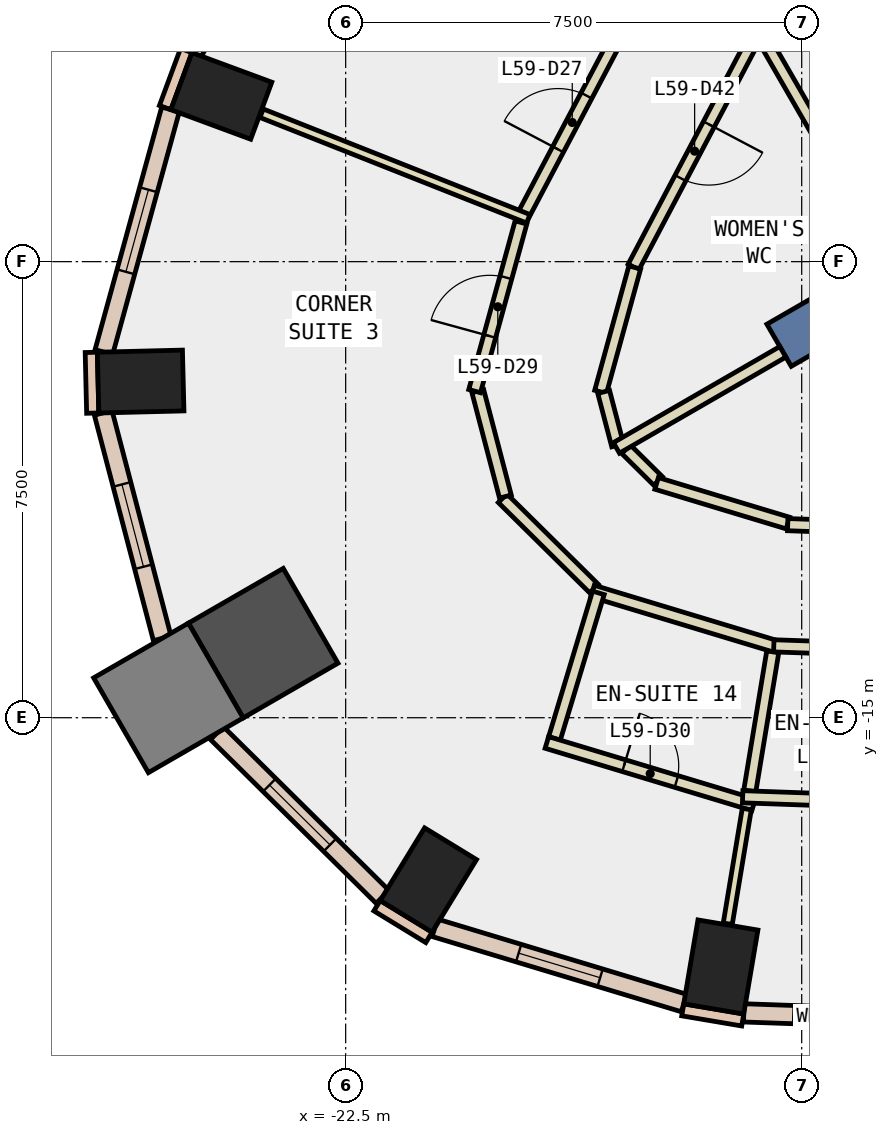
"""IFC4 building model, lengths in metres.
Left out: names, types, materials, properties, quantities, classifications, styles, units other than length and angle.
Written with IfcOpenShell. Run it as: python <this file> out.ifc"""

import sys

from ifc_helpers import new_model, si_unit, direction, frame, frame_2d, origin, origin_2d, place, context, subcontext, project, spatial, rectangle, extrude, element, fill, save


model = new_model("IFC4")
c1 = context("Model", 3, precision=1e-05, world=origin(), true_north=direction((0.0, 1.0)))
c2 = subcontext(c1, "Body", "Model", "MODEL_VIEW")
j1 = project(units=[si_unit("LENGTHUNIT", "METRE"), si_unit("PLANEANGLEUNIT", "RADIAN")], contexts=[c1])
p1 = place(None, origin())
s1 = spatial("IfcSite", under=j1, at=p1, CompositionType="ELEMENT")
p2 = place(p1, origin())
s2 = spatial("IfcBuilding", under=s1, at=p2, CompositionType="ELEMENT")
p3 = place(p2, frame((0.0, 0.0, 259.4)))
s3 = spatial("IfcBuildingStorey", under=s2, at=p3, CompositionType="ELEMENT", Elevation=259.4)
for number, where, z_axis, x_axis in (
    (1, (-16.33, -19.099, -0.34), (0.0, 0.0, 1.0), (-0.986, 0.167, 0.0)),
    (2, (-24.545, -4.775, -0.34), (0.0, 0.0, 1.0), (0.347, 0.938, 0.0)),
    (3, (-25.872, -9.472, -0.34), (0.0, 0.0, 1.0), (-0.025, 1.0, 0.0)),
):
    element("IfcColumn", number, at=place(p3, frame(where, z_axis=z_axis, x_axis=x_axis)), inside=s3, PredefinedType="COLUMN", context=c2, shape_type="SweptSolid", body=[
        extrude(rectangle(XDim=1.0, YDim=1.4, at=origin_2d()), origin(), (0.0, 0.0, 1.0), 3.6),
    ])
p4 = place(p3, frame((-23.856, -13.774, -0.34), z_axis=(0.0, 0.0, 1.0), x_axis=(0.866025403784, 0.5, 0.0)))
e4 = element("IfcColumn", 4, at=p4, inside=s3, PredefinedType="COLUMN", context=c2, shape_type="SweptSolid", body=[
    extrude(rectangle(XDim=1.8, YDim=1.8, at=origin_2d()), origin(), (0.0, 0.0, 1.0), 3.6),
])
p5 = place(p3, frame((-21.14, -17.67, -0.34), z_axis=(0.0, 0.0, 1.0), x_axis=(-0.853341581839, 0.521352227103, 0.0)))
e5 = element("IfcColumn", 5, at=p5, inside=s3, PredefinedType="COLUMN", context=c2, shape_type="SweptSolid", body=[
    extrude(rectangle(XDim=1.0, YDim=1.4, at=origin_2d()), origin(), (0.0, 0.0, 1.0), 3.6),
])
p6 = place(p3, frame((-25.415, -14.674, -0.34), z_axis=(0.0, 0.0, 1.0), x_axis=(0.866025403784, 0.5, 0.0)))
e6 = element("IfcColumn", 6, at=p6, inside=s3, PredefinedType="COLUMN", context=c2, shape_type="SweptSolid", body=[
    extrude(rectangle(XDim=1.8, YDim=1.8, at=origin_2d()), origin(), (0.0, 0.0, 1.0), 3.6),
])
p7 = place(p3, frame((-7.578, -4.375, -0.34), z_axis=(0.0, 0.0, 1.0), x_axis=(-0.866024315419, -0.5000018851, 0.0)))
e7 = element("IfcWall", 7, at=p7, inside=s3, PredefinedType="SHEAR", context=c2, shape_type="SweptSolid", body=[
    extrude(rectangle(XDim=9.0, YDim=0.8, at=frame_2d((4.5, 0.0))), origin(), (0.0, 0.0, 1.0), 3.6),
])
p8 = place(p3, frame((-25.122, -4.029, 0.0), z_axis=(0.0, 0.0, 1.0), x_axis=(-0.346892928577, -0.937904737222, 0.0)))
e8 = element("IfcWall", 8, at=p8, inside=s3, PredefinedType="STANDARD", context=c2, shape_type="SweptSolid", body=[
    extrude(rectangle(XDim=1.0, YDim=0.2, at=frame_2d((0.5, 0.0))), origin(), (0.0, 0.0, 1.0), 3.26),
])
p9 = place(p3, frame((-16.956, -19.804, 0.0), z_axis=(0.0, 0.0, 1.0), x_axis=(0.985961725342, -0.166971483074, 0.0)))
e9 = element("IfcWall", 9, at=p9, inside=s3, PredefinedType="STANDARD", context=c2, shape_type="SweptSolid", body=[
    extrude(rectangle(XDim=1.0, YDim=0.2, at=frame_2d((0.5, 0.0))), origin(), (0.0, 0.0, 1.0), 3.26),
])
p10 = place(p3, frame((-26.684, -8.992, 0.0), z_axis=(0.0, 0.0, 1.0), x_axis=(0.024186470916, -0.999707464524, 0.0)))
e10 = element("IfcWall", 10, at=p10, inside=s3, PredefinedType="STANDARD", context=c2, shape_type="SweptSolid", body=[
    extrude(rectangle(XDim=0.999, YDim=0.2, at=frame_2d((0.5, 0.0))), origin(), (0.0, 0.0, 1.0), 3.26),
])
p11 = place(p3, frame((-21.984, -18.092, 0.0), z_axis=(0.0, 0.0, 1.0), x_axis=(0.853679739553, -0.520798331677, 0.0)))
e11 = element("IfcWall", 11, at=p11, inside=s3, PredefinedType="STANDARD", context=c2, shape_type="SweptSolid", body=[
    extrude(rectangle(XDim=1.0, YDim=0.2, at=frame_2d((0.5, 0.0))), origin(), (0.0, 0.0, 1.0), 3.26),
])
p12 = place(p3, frame((-15.952, -19.854, 0.0), z_axis=(0.0, 0.0, 1.0), x_axis=(0.999387577449, -0.034992428331, 0.0)))
e12 = element("IfcWall", 12, at=p12, inside=s3, PredefinedType="STANDARD", context=c2, shape_type="SweptSolid", body=[
    extrude(rectangle(XDim=7.661, YDim=0.3, at=frame_2d((3.83, 0.0))), origin(), (0.0, 0.0, 1.0), 3.26),
])
p13 = place(p12, frame((0.815, 0.0, 0.9)))
e13 = element("IfcOpeningElement", 13, at=p13, cuts=e12, PredefinedType="OPENING", context=c2, shape_type="SweptSolid", body=[
    extrude(rectangle(XDim=2.2, YDim=2.0, at=frame_2d((1.1, 1.0))), frame((0.0, 0.16, 0.0), z_axis=(0.0, -1.0, 0.0), x_axis=(1.0, 0.0, 0.0)), (0.0, 0.0, 1.0), 0.32),
])
p14 = place(p12, frame((4.646, 0.0, 0.9)))
e14 = element("IfcOpeningElement", 14, at=p14, cuts=e12, PredefinedType="OPENING", context=c2, shape_type="SweptSolid", body=[
    extrude(rectangle(XDim=2.2, YDim=2.0, at=frame_2d((1.1, 1.0))), frame((0.0, 0.16, 0.0), z_axis=(0.0, -1.0, 0.0), x_axis=(1.0, 0.0, 0.0)), (0.0, 0.0, 1.0), 0.32),
])
p15 = place(p3, frame((-22.381, 0.916, 0.0), z_axis=(0.0, 0.0, 1.0), x_axis=(-0.466663589714, -0.884434900959, 0.0)))
e15 = element("IfcWall", 15, at=p15, inside=s3, PredefinedType="STANDARD", context=c2, shape_type="SweptSolid", body=[
    extrude(rectangle(XDim=5.638, YDim=0.3, at=frame_2d((2.819, 0.0))), origin(), (0.0, 0.0, 1.0), 3.26),
])
p16 = place(p15, frame((0.459, 0.0, 0.9)))
e16 = element("IfcOpeningElement", 16, at=p16, cuts=e15, PredefinedType="OPENING", context=c2, shape_type="SweptSolid", body=[
    extrude(rectangle(XDim=1.9, YDim=2.0, at=frame_2d((0.95, 1.0))), frame((0.0, 0.16, 0.0), z_axis=(0.0, -1.0, 0.0), x_axis=(1.0, 0.0, 0.0)), (0.0, 0.0, 1.0), 0.32),
])
p17 = place(p15, frame((3.278, 0.0, 0.9)))
e17 = element("IfcOpeningElement", 17, at=p17, cuts=e15, PredefinedType="OPENING", context=c2, shape_type="SweptSolid", body=[
    extrude(rectangle(XDim=1.9, YDim=2.0, at=frame_2d((0.95, 1.0))), frame((0.0, 0.16, 0.0), z_axis=(0.0, -1.0, 0.0), x_axis=(1.0, 0.0, 0.0)), (0.0, 0.0, 1.0), 0.32),
])
p18 = place(p3, frame((-25.381, -4.998, 0.0), z_axis=(0.0, 0.0, 1.0), x_axis=(-0.264924661919, -0.964269113633, 0.0)))
e18 = element("IfcWall", 18, at=p18, inside=s3, PredefinedType="STANDARD", context=c2, shape_type="SweptSolid", body=[
    extrude(rectangle(XDim=4.137, YDim=0.3, at=frame_2d((2.068, 0.0))), origin(), (0.0, 0.0, 1.0), 3.26),
])
p19 = place(p18, frame((1.368, 0.0, 0.9)))
e19 = element("IfcOpeningElement", 19, at=p19, cuts=e18, PredefinedType="OPENING", context=c2, shape_type="SweptSolid", body=[
    extrude(rectangle(XDim=1.4, YDim=2.0, at=frame_2d((0.7, 1.0))), frame((0.0, 0.16, 0.0), z_axis=(0.0, -1.0, 0.0), x_axis=(1.0, 0.0, 0.0)), (0.0, 0.0, 1.0), 0.32),
])
p20 = place(p3, frame((-26.488, -9.986, 0.0), z_axis=(0.0, 0.0, 1.0), x_axis=(0.253248721632, -0.967401201669, 0.0)))
e20 = element("IfcWall", 20, at=p20, inside=s3, PredefinedType="STANDARD", context=c2, shape_type="SweptSolid", body=[
    extrude(rectangle(XDim=3.834, YDim=0.3, at=frame_2d((1.917, 0.0))), origin(), (0.0, 0.0, 1.0), 3.26),
])
p21 = place(p20, frame((1.217, 0.0, 0.9)))
e21 = element("IfcOpeningElement", 21, at=p21, cuts=e20, PredefinedType="OPENING", context=c2, shape_type="SweptSolid", body=[
    extrude(rectangle(XDim=1.4, YDim=2.0, at=frame_2d((0.7, 1.0))), frame((0.0, 0.16, 0.0), z_axis=(0.0, -1.0, 0.0), x_axis=(1.0, 0.0, 0.0)), (0.0, 0.0, 1.0), 0.32),
])
p22 = place(p3, frame((-24.618, -15.252, 0.0), z_axis=(0.0, 0.0, 1.0), x_axis=(0.71110935557, -0.703081420904, 0.0)))
e22 = element("IfcWall", 22, at=p22, inside=s3, PredefinedType="STANDARD", context=c2, shape_type="SweptSolid", body=[
    extrude(rectangle(XDim=3.832, YDim=0.3, at=frame_2d((1.916, 0.0))), origin(), (0.0, 0.0, 1.0), 3.26),
])
p23 = place(p22, frame((1.216, 0.0, 0.9)))
e23 = element("IfcOpeningElement", 23, at=p23, cuts=e22, PredefinedType="OPENING", context=c2, shape_type="SweptSolid", body=[
    extrude(rectangle(XDim=1.4, YDim=2.0, at=frame_2d((0.7, 1.0))), frame((0.0, 0.16, 0.0), z_axis=(0.0, -1.0, 0.0), x_axis=(1.0, 0.0, 0.0)), (0.0, 0.0, 1.0), 0.32),
])
p24 = place(p3, frame((-21.034, -18.455, 0.0), z_axis=(0.0, 0.0, 1.0), x_axis=(0.957346168713, -0.288943442997, 0.0)))
e24 = element("IfcWall", 24, at=p24, inside=s3, PredefinedType="STANDARD", context=c2, shape_type="SweptSolid", body=[
    extrude(rectangle(XDim=4.281, YDim=0.3, at=frame_2d((2.14, 0.0))), origin(), (0.0, 0.0, 1.0), 3.26),
])
p25 = place(p24, frame((1.44, 0.0, 0.9)))
e25 = element("IfcOpeningElement", 25, at=p25, cuts=e24, PredefinedType="OPENING", context=c2, shape_type="SweptSolid", body=[
    extrude(rectangle(XDim=1.4, YDim=2.0, at=frame_2d((0.7, 1.0))), frame((0.0, 0.16, 0.0), z_axis=(0.0, -1.0, 0.0), x_axis=(1.0, 0.0, 0.0)), (0.0, 0.0, 1.0), 0.32),
])
p26 = place(p3, frame((-15.756, -3.779, 0.0), z_axis=(0.0, 0.0, 1.0), x_axis=(-0.46672043873, -0.884404902786, 0.0)))
e26 = element("IfcWall", 26, at=p26, inside=s3, PredefinedType="PARTITIONING", context=c2, shape_type="SweptSolid", body=[
    extrude(rectangle(XDim=4.307, YDim=0.2, at=frame_2d((2.153, 0.0))), origin(), (0.0, 0.0, 1.0), 3.26),
])
p27 = place(p26, frame((1.653, 0.0, 0.0)))
e27 = element("IfcOpeningElement", 27, at=p27, cuts=e26, PredefinedType="OPENING", context=c2, shape_type="SweptSolid", body=[
    extrude(rectangle(XDim=1.0, YDim=2.1, at=frame_2d((0.5, 1.05))), frame((0.0, 0.11, 0.0), z_axis=(0.0, -1.0, 0.0), x_axis=(1.0, 0.0, 0.0)), (0.0, 0.0, 1.0), 0.22),
])
p28 = place(p3, frame((-17.746, -7.596, 0.0), z_axis=(0.0, 0.0, 1.0), x_axis=(-0.264859637197, -0.96428697626, 0.0)))
e28 = element("IfcWall", 28, at=p28, inside=s3, PredefinedType="PARTITIONING", context=c2, shape_type="SweptSolid", body=[
    extrude(rectangle(XDim=2.122, YDim=0.2, at=frame_2d((1.061, 0.0))), origin(), (0.0, 0.0, 1.0), 3.26),
])
p29 = place(p3, frame((-18.257, -9.642, 0.0), z_axis=(0.0, 0.0, 1.0), x_axis=(0.253407342366, -0.967359663639, 0.0)))
e29 = element("IfcWall", 29, at=p29, inside=s3, PredefinedType="PARTITIONING", context=c2, shape_type="SweptSolid", body=[
    extrude(rectangle(XDim=0.907, YDim=0.2, at=frame_2d((0.454, 0.0))), origin(), (0.0, 0.0, 1.0), 3.26),
])
p30 = place(p3, frame((-17.89, -10.584, 0.0), z_axis=(0.0, 0.0, 1.0), x_axis=(0.711042348586, -0.70314918653, 0.0)))
e30 = element("IfcWall", 30, at=p30, inside=s3, PredefinedType="PARTITIONING", context=c2, shape_type="SweptSolid", body=[
    extrude(rectangle(XDim=0.742, YDim=0.2, at=frame_2d((0.371, 0.0))), origin(), (0.0, 0.0, 1.0), 3.26),
])
p31 = place(p3, frame((-17.386, -11.147, 0.0), z_axis=(0.0, 0.0, 1.0), x_axis=(0.957321496956, -0.289025174451, 0.0)))
e31 = element("IfcWall", 31, at=p31, inside=s3, PredefinedType="PARTITIONING", context=c2, shape_type="SweptSolid", body=[
    extrude(rectangle(XDim=2.256, YDim=0.2, at=frame_2d((1.128, 0.0))), origin(), (0.0, 0.0, 1.0), 3.26),
])
p32 = place(p3, frame((-15.23, -11.825, 0.0), z_axis=(0.0, 0.0, 1.0), x_axis=(0.999397560436, -0.0347061406, 0.0)))
e32 = element("IfcWall", 32, at=p32, inside=s3, PredefinedType="PARTITIONING", context=c2, shape_type="SweptSolid", body=[
    extrude(rectangle(XDim=4.207, YDim=0.2, at=frame_2d((2.103, 0.0))), origin(), (0.0, 0.0, 1.0), 3.26),
])
p33 = place(p32, frame((1.603, 0.0, 0.0)))
e33 = element("IfcOpeningElement", 33, at=p33, cuts=e32, PredefinedType="OPENING", context=c2, shape_type="SweptSolid", body=[
    extrude(rectangle(XDim=1.0, YDim=2.1, at=frame_2d((0.5, 1.05))), frame((0.0, 0.11, 0.0), z_axis=(0.0, -1.0, 0.0), x_axis=(1.0, 0.0, 0.0)), (0.0, 0.0, 1.0), 0.22),
])
p34 = place(p3, frame((-19.602, -6.781, 0.0), z_axis=(0.0, 0.0, 1.0), x_axis=(0.466827780692, 0.884348247679, 0.0)))
e34 = element("IfcWall", 34, at=p34, inside=s3, PredefinedType="PARTITIONING", context=c2, shape_type="SweptSolid", body=[
    extrude(rectangle(XDim=3.451, YDim=0.2, at=frame_2d((1.726, 0.0))), origin(), (0.0, 0.0, 1.0), 3.26),
])
p35 = place(p34, frame((1.275, 0.0, 0.0)))
e35 = element("IfcOpeningElement", 35, at=p35, cuts=e34, PredefinedType="OPENING", context=c2, shape_type="SweptSolid", body=[
    extrude(rectangle(XDim=1.0, YDim=2.1, at=frame_2d((0.5, 1.05))), frame((0.0, 0.11, 0.0), z_axis=(0.0, -1.0, 0.0), x_axis=(1.0, 0.0, 0.0)), (0.0, 0.0, 1.0), 0.22),
])
p36 = place(p3, frame((-18.415, -12.877, 0.0), z_axis=(0.0, 0.0, 1.0), x_axis=(-0.711078065077, 0.70311306727, 0.0)))
e36 = element("IfcWall", 36, at=p36, inside=s3, PredefinedType="PARTITIONING", context=c2, shape_type="SweptSolid", body=[
    extrude(rectangle(XDim=2.115, YDim=0.2, at=frame_2d((1.058, 0.0))), origin(), (0.0, 0.0, 1.0), 3.26),
])
p37 = place(p3, frame((-19.873, -11.363, 0.0), z_axis=(0.0, 0.0, 1.0), x_axis=(-0.253192482031, 0.967415922467, 0.0)))
e37 = element("IfcWall", 37, at=p37, inside=s3, PredefinedType="PARTITIONING", context=c2, shape_type="SweptSolid", body=[
    extrude(rectangle(XDim=1.792, YDim=0.2, at=frame_2d((0.896, 0.0))), origin(), (0.0, 0.0, 1.0), 3.26),
])
p38 = place(p3, frame((-20.379, -9.629, 0.0), z_axis=(0.0, 0.0, 1.0), x_axis=(0.26487636938, 0.964282380293, 0.0)))
e38 = element("IfcWall", 38, at=p38, inside=s3, PredefinedType="PARTITIONING", context=c2, shape_type="SweptSolid", body=[
    extrude(rectangle(XDim=2.877, YDim=0.2, at=frame_2d((1.438, 0.0))), origin(), (0.0, 0.0, 1.0), 3.26),
])
p39 = place(p38, frame((0.938, 0.0, 0.0)))
e39 = element("IfcOpeningElement", 39, at=p39, cuts=e38, PredefinedType="OPENING", context=c2, shape_type="SweptSolid", body=[
    extrude(rectangle(XDim=1.0, YDim=2.1, at=frame_2d((0.5, 1.05))), frame((0.0, 0.11, 0.0), z_axis=(0.0, -1.0, 0.0), x_axis=(1.0, 0.0, 0.0)), (0.0, 0.0, 1.0), 0.22),
])
p40 = place(p3, frame((-15.363, -13.847, 0.0), z_axis=(0.0, 0.0, 1.0), x_axis=(-0.957320969561, 0.289026921303, 0.0)))
e40 = element("IfcWall", 40, at=p40, inside=s3, PredefinedType="PARTITIONING", context=c2, shape_type="SweptSolid", body=[
    extrude(rectangle(XDim=3.214, YDim=0.2, at=frame_2d((1.607, 0.0))), origin(), (0.0, 0.0, 1.0), 3.26),
])
p41 = place(p3, frame((-12.961, -13.905, 0.0), z_axis=(0.0, 0.0, 1.0), x_axis=(-0.999395279268, 0.034771766949, 0.0)))
e41 = element("IfcWall", 41, at=p41, inside=s3, PredefinedType="PARTITIONING", context=c2, shape_type="SweptSolid", body=[
    extrude(rectangle(XDim=2.5, YDim=0.2, at=frame_2d((1.25, 0.0))), origin(), (0.0, 0.0, 1.0), 3.26),
])
p42 = place(p3, frame((-13.58, -7.379, 0.0), z_axis=(0.0, 0.0, 1.0), x_axis=(-0.499916403993, 0.866073662582, 0.0)))
e42 = element("IfcWall", 42, at=p42, inside=s3, PredefinedType="PARTITIONING", context=c2, shape_type="SweptSolid", body=[
    extrude(rectangle(XDim=4.359, YDim=0.2, at=frame_2d((2.179, 0.0))), origin(), (0.0, 0.0, 1.0), 3.26),
])
p43 = place(p3, frame((-15.31, -8.983, 0.0), z_axis=(0.0, 0.0, 1.0), x_axis=(-0.866047943894, -0.499960957353, 0.0)))
e43 = element("IfcWall", 43, at=p43, inside=s3, PredefinedType="PARTITIONING", context=c2, shape_type="SweptSolid", body=[
    extrude(rectangle(XDim=3.16, YDim=0.2, at=frame_2d((1.58, 0.0))), origin(), (0.0, 0.0, 1.0), 3.26),
])
p44 = place(p3, frame((-19.497, -6.795, 0.0), z_axis=(0.0, 0.0, 1.0), x_axis=(-0.929826906887, 0.367997178289, 0.0)))
e44 = element("IfcWall", 44, at=p44, inside=s3, PredefinedType="PARTITIONING", context=c2, shape_type="SweptSolid", body=[
    extrude(rectangle(XDim=4.717, YDim=0.15, at=frame_2d((2.358, 0.0))), origin(), (0.0, 0.0, 1.0), 3.26),
])
p45 = place(p3, frame((-18.344, -12.947, 0.0), z_axis=(0.0, 0.0, 1.0), x_axis=(-0.288709122303, -0.957416859419, 0.0)))
e45 = element("IfcWall", 45, at=p45, inside=s3, PredefinedType="PARTITIONING", context=c2, shape_type="SweptSolid", body=[
    extrude(rectangle(XDim=2.5, YDim=0.2, at=frame_2d((1.25, 0.0))), origin(), (0.0, 0.0, 1.0), 3.26),
])
p46 = place(p3, frame((-19.191, -15.407, 0.0), z_axis=(0.0, 0.0, 1.0), x_axis=(0.957443200759, -0.28862175476, 0.0)))
e46 = element("IfcWall", 46, at=p46, inside=s3, PredefinedType="PARTITIONING", context=c2, shape_type="SweptSolid", body=[
    extrude(rectangle(XDim=3.551, YDim=0.2, at=frame_2d((1.775, 0.0))), origin(), (0.0, 0.0, 1.0), 3.26),
])
p47 = place(p46, frame((1.325, 0.0, 0.0)))
e47 = element("IfcOpeningElement", 47, at=p47, cuts=e46, PredefinedType="OPENING", context=c2, shape_type="SweptSolid", body=[
    extrude(rectangle(XDim=0.9, YDim=2.1, at=frame_2d((0.45, 1.05))), frame((0.0, 0.11, 0.0), z_axis=(0.0, -1.0, 0.0), x_axis=(1.0, 0.0, 0.0)), (0.0, 0.0, 1.0), 0.22),
])
p48 = place(p3, frame((-15.903, -16.502, 0.0), z_axis=(0.0, 0.0, 1.0), x_axis=(-0.163715562906, -0.986507584594, 0.0)))
e48 = element("IfcWall", 48, at=p48, inside=s3, PredefinedType="PARTITIONING", context=c2, shape_type="SweptSolid", body=[
    extrude(rectangle(XDim=1.912, YDim=0.15, at=frame_2d((0.956, 0.0))), origin(), (0.0, 0.0, 1.0), 3.26),
])
p49 = place(p3, frame((-15.476, -13.917, 0.0), z_axis=(0.0, 0.0, 1.0), x_axis=(-0.162964805234, -0.986631882849, 0.0)))
e49 = element("IfcWall", 49, at=p49, inside=s3, PredefinedType="PARTITIONING", context=c2, shape_type="SweptSolid", body=[
    extrude(rectangle(XDim=2.319, YDim=0.2, at=frame_2d((1.16, 0.0))), origin(), (0.0, 0.0, 1.0), 3.26),
])
p50 = place(p3, frame((-15.971, -16.3, 0.0), z_axis=(0.0, 0.0, 1.0), x_axis=(0.999370791233, -0.035468600627, 0.0)))
e50 = element("IfcWall", 50, at=p50, inside=s3, PredefinedType="PARTITIONING", context=c2, shape_type="SweptSolid", body=[
    extrude(rectangle(XDim=3.125, YDim=0.2, at=frame_2d((1.562, 0.0))), origin(), (0.0, 0.0, 1.0), 3.26),
])
p51 = place(p50, frame((1.112, 0.0, 0.0)))
e51 = element("IfcOpeningElement", 51, at=p51, cuts=e50, PredefinedType="OPENING", context=c2, shape_type="SweptSolid", body=[
    extrude(rectangle(XDim=0.9, YDim=2.1, at=frame_2d((0.45, 1.05))), frame((0.0, 0.11, 0.0), z_axis=(0.0, -1.0, 0.0), x_axis=(1.0, 0.0, 0.0)), (0.0, 0.0, 1.0), 0.22),
])
p52 = place(p13, origin())
e52 = element("IfcWindow", 52, at=p52, inside=s3, PartitioningType="SINGLE_PANEL", PredefinedType="WINDOW", context=c2, shape_type="SweptSolid", body=[
    extrude(rectangle(XDim=2.2, YDim=2.0, at=frame_2d((1.1, 1.0))), frame((0.0, 0.03, 0.0), z_axis=(0.0, -1.0, 0.0), x_axis=(1.0, 0.0, 0.0)), (0.0, 0.0, 1.0), 0.06),
])
fill(e13, e52)
p53 = place(p19, origin())
e53 = element("IfcWindow", 53, at=p53, inside=s3, PartitioningType="SINGLE_PANEL", PredefinedType="WINDOW", context=c2, shape_type="SweptSolid", body=[
    extrude(rectangle(XDim=1.4, YDim=2.0, at=frame_2d((0.7, 1.0))), frame((0.0, 0.03, 0.0), z_axis=(0.0, -1.0, 0.0), x_axis=(1.0, 0.0, 0.0)), (0.0, 0.0, 1.0), 0.06),
])
fill(e19, e53)
p54 = place(p21, origin())
e54 = element("IfcWindow", 54, at=p54, inside=s3, PartitioningType="SINGLE_PANEL", PredefinedType="WINDOW", context=c2, shape_type="SweptSolid", body=[
    extrude(rectangle(XDim=1.4, YDim=2.0, at=frame_2d((0.7, 1.0))), frame((0.0, 0.03, 0.0), z_axis=(0.0, -1.0, 0.0), x_axis=(1.0, 0.0, 0.0)), (0.0, 0.0, 1.0), 0.06),
])
fill(e21, e54)
p55 = place(p23, origin())
e55 = element("IfcWindow", 55, at=p55, inside=s3, PartitioningType="SINGLE_PANEL", PredefinedType="WINDOW", context=c2, shape_type="SweptSolid", body=[
    extrude(rectangle(XDim=1.4, YDim=2.0, at=frame_2d((0.7, 1.0))), frame((0.0, 0.03, 0.0), z_axis=(0.0, -1.0, 0.0), x_axis=(1.0, 0.0, 0.0)), (0.0, 0.0, 1.0), 0.06),
])
fill(e23, e55)
p56 = place(p25, origin())
e56 = element("IfcWindow", 56, at=p56, inside=s3, PartitioningType="SINGLE_PANEL", PredefinedType="WINDOW", context=c2, shape_type="SweptSolid", body=[
    extrude(rectangle(XDim=1.4, YDim=2.0, at=frame_2d((0.7, 1.0))), frame((0.0, 0.03, 0.0), z_axis=(0.0, -1.0, 0.0), x_axis=(1.0, 0.0, 0.0)), (0.0, 0.0, 1.0), 0.06),
])
fill(e25, e56)
p57 = place(p35, origin())
e57 = element("IfcDoor", 57, at=p57, inside=s3, OperationType="SINGLE_SWING_LEFT", PredefinedType="DOOR", context=c2, shape_type="SweptSolid", body=[
    extrude(rectangle(XDim=1.0, YDim=2.1, at=frame_2d((0.5, 1.05))), frame((0.0, 0.025, 0.0), z_axis=(0.0, -1.0, 0.0), x_axis=(1.0, 0.0, 0.0)), (0.0, 0.0, 1.0), 0.05),
])
fill(e35, e57)
p58 = place(p39, origin())
e58 = element("IfcDoor", 58, at=p58, inside=s3, OperationType="SINGLE_SWING_LEFT", PredefinedType="DOOR", context=c2, shape_type="SweptSolid", body=[
    extrude(rectangle(XDim=1.0, YDim=2.1, at=frame_2d((0.5, 1.05))), frame((0.0, 0.025, 0.0), z_axis=(0.0, -1.0, 0.0), x_axis=(1.0, 0.0, 0.0)), (0.0, 0.0, 1.0), 0.05),
])
fill(e39, e58)
p59 = place(p47, origin())
e59 = element("IfcDoor", 59, at=p59, inside=s3, OperationType="SINGLE_SWING_LEFT", PredefinedType="DOOR", context=c2, shape_type="SweptSolid", body=[
    extrude(rectangle(XDim=0.9, YDim=2.1, at=frame_2d((0.45, 1.05))), frame((0.0, 0.025, 0.0), z_axis=(0.0, -1.0, 0.0), x_axis=(1.0, 0.0, 0.0)), (0.0, 0.0, 1.0), 0.05),
])
fill(e47, e59)
p60 = place(p27, origin())
e60 = element("IfcDoor", 60, at=p60, inside=s3, OperationType="SINGLE_SWING_LEFT", PredefinedType="DOOR", context=c2, shape_type="SweptSolid", body=[
    extrude(rectangle(XDim=1.0, YDim=2.1, at=frame_2d((0.5, 1.05))), frame((0.0, 0.025, 0.0), z_axis=(0.0, -1.0, 0.0), x_axis=(1.0, 0.0, 0.0)), (0.0, 0.0, 1.0), 0.05),
])
fill(e27, e60)
save(model, sys.argv[1])
